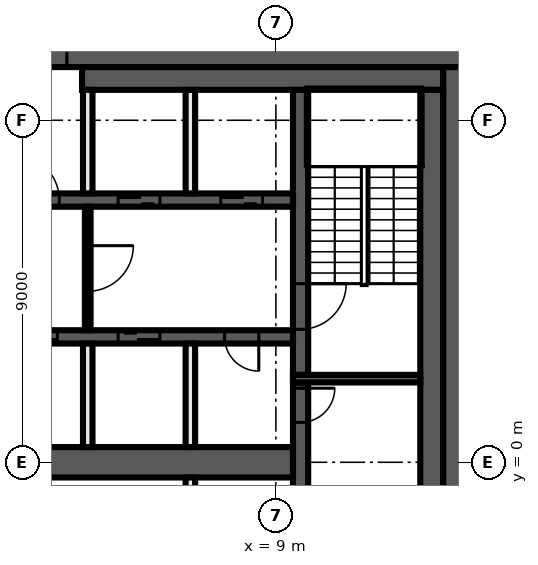
"""IFC4 building model, lengths in metres.
Left out: names, types, materials, properties, quantities, classifications, styles, units other than length and angle.
Written with IfcOpenShell. Run it as: python <this file> out.ifc"""

import sys

from ifc_helpers import new_model, si_unit, direction, frame, frame_2d, origin, place, context, subcontext, project, spatial, rectangle, extrude, element, fill, save


model = new_model("IFC4")
c1 = context("Model", 3, precision=1e-05, world=origin(), true_north=direction((0.0, 1.0)))
c2 = subcontext(c1, "Body", "Model", "MODEL_VIEW")
j1 = project(units=[si_unit("LENGTHUNIT", "METRE"), si_unit("PLANEANGLEUNIT", "RADIAN")], contexts=[c1])
p1 = place(None, origin())
s1 = spatial("IfcSite", under=j1, at=p1, CompositionType="ELEMENT")
p2 = place(p1, origin())
s2 = spatial("IfcBuilding", under=s1, at=p2, CompositionType="ELEMENT")
p3 = place(p2, frame((0.0, 0.0, 336.2)))
s3 = spatial("IfcBuildingStorey", under=s2, at=p3, CompositionType="ELEMENT", Elevation=336.2)
p4 = place(p3, frame((-14.0, 10.7, 0.0), z_axis=(0.0, 0.0, 1.0), x_axis=(1.0, 0.0, 0.0)))
e1 = element("IfcWall", 1, at=p4, inside=s3, PredefinedType="SHEAR", context=c2, shape_type="SweptSolid", body=[
    extrude(rectangle(XDim=28.0, YDim=0.6, at=frame_2d((14.0, 0.0))), origin(), (0.0, 0.0, 1.0), 3.82),
])
p5 = place(p4, frame((15.9, 0.0, 0.0)))
e2 = element("IfcOpeningElement", 2, at=p5, cuts=e1, PredefinedType="OPENING", context=c2, shape_type="SweptSolid", body=[
    extrude(rectangle(XDim=1.6, YDim=2.1, at=frame_2d((0.8, 1.05))), frame((0.0, 0.31, 0.0), z_axis=(0.0, -1.0, 0.0), x_axis=(1.0, 0.0, 0.0)), (0.0, 0.0, 1.0), 0.62),
])
p6 = place(p3, frame((13.7, 10.4, 0.0), z_axis=(0.0, 0.0, 1.0), x_axis=(0.0, -1.0, 0.0)))
e3 = element("IfcWall", 3, at=p6, inside=s3, PredefinedType="SHEAR", context=c2, shape_type="SweptSolid", body=[
    extrude(rectangle(XDim=20.8, YDim=0.6, at=frame_2d((10.4, 0.0))), origin(), (0.0, 0.0, 1.0), 3.82),
])
p7 = place(p3, frame((3.9, 10.1, 0.0), z_axis=(0.0, 0.0, 1.0), x_axis=(1.0, 0.0, 0.0)))
e4 = element("IfcWall", 4, at=p7, inside=s3, PredefinedType="SHEAR", context=c2, shape_type="SweptSolid", body=[
    extrude(rectangle(XDim=9.5, YDim=0.6, at=frame_2d((4.75, 0.0))), origin(), (0.0, 0.0, 1.0), 3.82),
])
p8 = place(p3, frame((13.1, 9.8, 0.0), z_axis=(0.0, 0.0, 1.0), x_axis=(0.0, -1.0, 0.0)))
e5 = element("IfcWall", 5, at=p8, inside=s3, PredefinedType="SHEAR", context=c2, shape_type="SweptSolid", body=[
    extrude(rectangle(XDim=19.6, YDim=0.6, at=frame_2d((9.8, 0.0))), origin(), (0.0, 0.0, 1.0), 3.82),
])
p9 = place(p3, frame((9.65, 2.1, 0.0), z_axis=(0.0, 0.0, 1.0), x_axis=(0.0, -1.0, 0.0)))
e6 = element("IfcWall", 6, at=p9, inside=s3, PredefinedType="SHEAR", context=c2, shape_type="SweptSolid", body=[
    extrude(rectangle(XDim=4.2, YDim=0.4, at=frame_2d((2.1, 0.0))), origin(), (0.0, 0.0, 1.0), 3.82),
])
p10 = place(p9, frame((0.15, 0.0, 0.0)))
e7 = element("IfcOpeningElement", 7, at=p10, cuts=e6, PredefinedType="OPENING", context=c2, shape_type="SweptSolid", body=[
    extrude(rectangle(XDim=0.9, YDim=2.1, at=frame_2d((0.45, 1.05))), frame((0.0, 0.21, 0.0), z_axis=(0.0, -1.0, 0.0), x_axis=(1.0, 0.0, 0.0)), (0.0, 0.0, 1.0), 0.42),
])
p11 = place(p3, frame((9.65, 9.8, 0.0), z_axis=(0.0, 0.0, 1.0), x_axis=(0.0, -1.0, 0.0)))
e8 = element("IfcWall", 8, at=p11, inside=s3, PredefinedType="SHEAR", context=c2, shape_type="SweptSolid", body=[
    extrude(rectangle(XDim=7.5, YDim=0.4, at=frame_2d((3.75, 0.0))), origin(), (0.0, 0.0, 1.0), 3.82),
])
p12 = place(p11, frame((5.1, 0.0, 0.0)))
e9 = element("IfcOpeningElement", 9, at=p12, cuts=e8, PredefinedType="OPENING", context=c2, shape_type="SweptSolid", body=[
    extrude(rectangle(XDim=1.2, YDim=2.1, at=frame_2d((0.6, 1.05))), frame((0.0, 0.21, 0.0), z_axis=(0.0, -1.0, 0.0), x_axis=(1.0, 0.0, 0.0)), (0.0, 0.0, 1.0), 0.42),
])
p13 = place(p3, frame((9.45, 2.2, 0.0), z_axis=(0.0, 0.0, 1.0), x_axis=(1.0, 0.0, 0.0)))
e10 = element("IfcWall", 10, at=p13, inside=s3, PredefinedType="SHEAR", context=c2, shape_type="SweptSolid", body=[
    extrude(rectangle(XDim=3.35, YDim=0.2, at=frame_2d((1.675, 0.0))), origin(), (0.0, 0.0, 1.0), 3.82),
])
p14 = place(p3, frame((-9.45, 6.9, 0.0), z_axis=(0.0, 0.0, 1.0), x_axis=(1.0, 0.0, 0.0)))
e11 = element("IfcWall", 11, at=p14, inside=s3, PredefinedType="SHEAR", context=c2, shape_type="SweptSolid", body=[
    extrude(rectangle(XDim=18.9, YDim=0.35, at=frame_2d((9.45, 0.0))), origin(), (0.0, 0.0, 1.0), 3.82),
])
p15 = place(p14, frame((11.55, 0.0, 0.0)))
e12 = element("IfcOpeningElement", 12, at=p15, cuts=e11, PredefinedType="OPENING", context=c2, shape_type="SweptSolid", body=[
    extrude(rectangle(XDim=1.2, YDim=2.1, at=frame_2d((0.6, 1.05))), frame((0.0, 0.185, 0.0), z_axis=(0.0, -1.0, 0.0), x_axis=(1.0, 0.0, 0.0)), (0.0, 0.0, 1.0), 0.37),
])
p16 = place(p14, frame((14.3, 0.0, 0.0)))
e13 = element("IfcOpeningElement", 13, at=p16, cuts=e11, PredefinedType="OPENING", context=c2, shape_type="SweptSolid", body=[
    extrude(rectangle(XDim=1.1, YDim=2.1, at=frame_2d((0.55, 1.05))), frame((0.0, 0.185, 0.0), z_axis=(0.0, -1.0, 0.0), x_axis=(1.0, 0.0, 0.0)), (0.0, 0.0, 1.0), 0.37),
])
p17 = place(p14, frame((17.0, 0.0, 0.0)))
e14 = element("IfcOpeningElement", 14, at=p17, cuts=e11, PredefinedType="OPENING", context=c2, shape_type="SweptSolid", body=[
    extrude(rectangle(XDim=1.1, YDim=2.1, at=frame_2d((0.55, 1.05))), frame((0.0, 0.185, 0.0), z_axis=(0.0, -1.0, 0.0), x_axis=(1.0, 0.0, 0.0)), (0.0, 0.0, 1.0), 0.37),
])
p18 = place(p14, frame((3.6, 0.0, 0.0)))
e15 = element("IfcOpeningElement", 15, at=p18, cuts=e11, PredefinedType="OPENING", context=c2, shape_type="SweptSolid", body=[
    extrude(rectangle(XDim=0.9, YDim=2.1, at=frame_2d((0.45, 1.05))), frame((0.0, 0.185, 0.0), z_axis=(0.0, -1.0, 0.0), x_axis=(1.0, 0.0, 0.0)), (0.0, 0.0, 1.0), 0.37),
])
p19 = place(p14, frame((9.0, 0.0, 0.0)))
e16 = element("IfcOpeningElement", 16, at=p19, cuts=e11, PredefinedType="OPENING", context=c2, shape_type="SweptSolid", body=[
    extrude(rectangle(XDim=0.9, YDim=2.1, at=frame_2d((0.45, 1.05))), frame((0.0, 0.185, 0.0), z_axis=(0.0, -1.0, 0.0), x_axis=(1.0, 0.0, 0.0)), (0.0, 0.0, 1.0), 0.37),
])
p20 = place(p3, frame((9.45, 3.3, 0.0), z_axis=(0.0, 0.0, 1.0), x_axis=(-1.0, 0.0, 0.0)))
e17 = element("IfcWall", 17, at=p20, inside=s3, PredefinedType="SHEAR", context=c2, shape_type="SweptSolid", body=[
    extrude(rectangle(XDim=18.9, YDim=0.35, at=frame_2d((9.45, 0.0))), origin(), (0.0, 0.0, 1.0), 3.82),
])
p21 = place(p20, frame((6.2, 0.0, 0.0)))
e18 = element("IfcOpeningElement", 18, at=p21, cuts=e17, PredefinedType="OPENING", context=c2, shape_type="SweptSolid", body=[
    extrude(rectangle(XDim=1.1, YDim=2.1, at=frame_2d((0.55, 1.05))), frame((0.0, 0.185, 0.0), z_axis=(0.0, -1.0, 0.0), x_axis=(1.0, 0.0, 0.0)), (0.0, 0.0, 1.0), 0.37),
])
p22 = place(p20, frame((3.5, 0.0, 0.0)))
e19 = element("IfcOpeningElement", 19, at=p22, cuts=e17, PredefinedType="OPENING", context=c2, shape_type="SweptSolid", body=[
    extrude(rectangle(XDim=1.1, YDim=2.1, at=frame_2d((0.55, 1.05))), frame((0.0, 0.185, 0.0), z_axis=(0.0, -1.0, 0.0), x_axis=(1.0, 0.0, 0.0)), (0.0, 0.0, 1.0), 0.37),
])
p23 = place(p20, frame((0.9, 0.0, 0.0)))
e20 = element("IfcOpeningElement", 20, at=p23, cuts=e17, PredefinedType="OPENING", context=c2, shape_type="SweptSolid", body=[
    extrude(rectangle(XDim=0.9, YDim=2.1, at=frame_2d((0.45, 1.05))), frame((0.0, 0.185, 0.0), z_axis=(0.0, -1.0, 0.0), x_axis=(1.0, 0.0, 0.0)), (0.0, 0.0, 1.0), 0.37),
])
p24 = place(p20, frame((17.1, 0.0, 0.0)))
e21 = element("IfcOpeningElement", 21, at=p24, cuts=e17, PredefinedType="OPENING", context=c2, shape_type="SweptSolid", body=[
    extrude(rectangle(XDim=0.9, YDim=2.1, at=frame_2d((0.45, 1.05))), frame((0.0, 0.185, 0.0), z_axis=(0.0, -1.0, 0.0), x_axis=(1.0, 0.0, 0.0)), (0.0, 0.0, 1.0), 0.37),
])
p25 = place(p20, frame((14.4, 0.0, 0.0)))
e22 = element("IfcOpeningElement", 22, at=p25, cuts=e17, PredefinedType="OPENING", context=c2, shape_type="SweptSolid", body=[
    extrude(rectangle(XDim=0.9, YDim=2.1, at=frame_2d((0.45, 1.05))), frame((0.0, 0.185, 0.0), z_axis=(0.0, -1.0, 0.0), x_axis=(1.0, 0.0, 0.0)), (0.0, 0.0, 1.0), 0.37),
])
p26 = place(p20, frame((11.7, 0.0, 0.0)))
e23 = element("IfcOpeningElement", 23, at=p26, cuts=e17, PredefinedType="OPENING", context=c2, shape_type="SweptSolid", body=[
    extrude(rectangle(XDim=0.9, YDim=2.1, at=frame_2d((0.45, 1.05))), frame((0.0, 0.185, 0.0), z_axis=(0.0, -1.0, 0.0), x_axis=(1.0, 0.0, 0.0)), (0.0, 0.0, 1.0), 0.37),
])
p27 = place(p20, frame((9.0, 0.0, 0.0)))
e24 = element("IfcOpeningElement", 24, at=p27, cuts=e17, PredefinedType="OPENING", context=c2, shape_type="SweptSolid", body=[
    extrude(rectangle(XDim=0.9, YDim=2.1, at=frame_2d((0.45, 1.05))), frame((0.0, 0.185, 0.0), z_axis=(0.0, -1.0, 0.0), x_axis=(1.0, 0.0, 0.0)), (0.0, 0.0, 1.0), 0.37),
])
p28 = place(p3, frame((-9.45, 0.0, 0.0), z_axis=(0.0, 0.0, 1.0), x_axis=(1.0, 0.0, 0.0)))
e25 = element("IfcWall", 25, at=p28, inside=s3, PredefinedType="SHEAR", context=c2, shape_type="SweptSolid", body=[
    extrude(rectangle(XDim=18.9, YDim=0.8, at=frame_2d((9.45, 0.0))), origin(), (0.0, 0.0, 1.0), 3.82),
])
for number, where, z_axis, x_axis in (
    (26, (6.75, -3.125, 0.0), (0.0, 0.0, 1.0), (0.0, 1.0, 0.0)),
    (27, (6.75, 0.4, 0.0), (0.0, 0.0, 1.0), (0.0, 1.0, 0.0)),
    (28, (6.75, 7.075, 0.0), (0.0, 0.0, 1.0), (0.0, 1.0, 0.0)),
):
    element("IfcWall", number, at=place(p3, frame(where, z_axis=z_axis, x_axis=x_axis)), inside=s3, PredefinedType="SOLIDWALL", context=c2, shape_type="SweptSolid", body=[
        extrude(rectangle(XDim=2.725, YDim=0.25, at=frame_2d((1.363, 0.0))), origin(), (0.0, 0.0, 1.0), 3.82),
    ])
p29 = place(p3, frame((4.05, 6.725, 0.0), z_axis=(0.0, 0.0, 1.0), x_axis=(0.0, -1.0, 0.0)))
e29 = element("IfcWall", 29, at=p29, inside=s3, PredefinedType="PARTITIONING", context=c2, shape_type="SweptSolid", body=[
    extrude(rectangle(XDim=3.25, YDim=0.15, at=frame_2d((1.625, 0.0))), origin(), (0.0, 0.0, 1.0), 3.82),
])
p30 = place(p29, frame((1.025, 0.0, 0.0)))
e30 = element("IfcOpeningElement", 30, at=p30, cuts=e29, PredefinedType="OPENING", context=c2, shape_type="SweptSolid", body=[
    extrude(rectangle(XDim=1.2, YDim=2.1, at=frame_2d((0.6, 1.05))), frame((0.0, 0.085, 0.0), z_axis=(0.0, -1.0, 0.0), x_axis=(1.0, 0.0, 0.0)), (0.0, 0.0, 1.0), 0.17),
])
for number, where, z_axis, x_axis in (
    (31, (4.05, 0.4, 0.0), (0.0, 0.0, 1.0), (0.0, 1.0, 0.0)),
    (32, (4.05, 7.075, 0.0), (0.0, 0.0, 1.0), (0.0, 1.0, 0.0)),
):
    element("IfcWall", number, at=place(p3, frame(where, z_axis=z_axis, x_axis=x_axis)), inside=s3, PredefinedType="SOLIDWALL", context=c2, shape_type="SweptSolid", body=[
        extrude(rectangle(XDim=2.725, YDim=0.25, at=frame_2d((1.363, 0.0))), origin(), (0.0, 0.0, 1.0), 3.82),
    ])
p31 = place(p10, origin())
e33 = element("IfcDoor", 33, at=p31, inside=s3, OperationType="SINGLE_SWING_RIGHT", PredefinedType="DOOR", context=c2, shape_type="SweptSolid", body=[
    extrude(rectangle(XDim=0.9, YDim=2.1, at=frame_2d((0.45, 1.05))), frame((0.0, 0.025, 0.0), z_axis=(0.0, -1.0, 0.0), x_axis=(1.0, 0.0, 0.0)), (0.0, 0.0, 1.0), 0.05),
])
fill(e7, e33)
p32 = place(p5, origin())
e34 = element("IfcDoor", 34, at=p32, inside=s3, OperationType="DOUBLE_DOOR_SINGLE_SWING", PredefinedType="DOOR", context=c2, shape_type="SweptSolid", body=[
    extrude(rectangle(XDim=1.6, YDim=2.1, at=frame_2d((0.8, 1.05))), frame((0.0, 0.025, 0.0), z_axis=(0.0, -1.0, 0.0), x_axis=(1.0, 0.0, 0.0)), (0.0, 0.0, 1.0), 0.05),
])
fill(e2, e34)
p33 = place(p15, origin())
e35 = element("IfcDoor", 35, at=p33, inside=s3, OperationType="SINGLE_SWING_LEFT", PredefinedType="DOOR", context=c2, shape_type="SweptSolid", body=[
    extrude(rectangle(XDim=1.2, YDim=2.1, at=frame_2d((0.6, 1.05))), frame((0.0, 0.025, 0.0), z_axis=(0.0, -1.0, 0.0), x_axis=(1.0, 0.0, 0.0)), (0.0, 0.0, 1.0), 0.05),
])
fill(e12, e35)
p34 = place(p16, origin())
e36 = element("IfcDoor", 36, at=p34, inside=s3, OperationType="DOUBLE_DOOR_SLIDING", PredefinedType="DOOR", context=c2, shape_type="SweptSolid", body=[
    extrude(rectangle(XDim=1.1, YDim=2.1, at=frame_2d((0.55, 1.05))), frame((0.0, 0.025, 0.0), z_axis=(0.0, -1.0, 0.0), x_axis=(1.0, 0.0, 0.0)), (0.0, 0.0, 1.0), 0.05),
])
fill(e13, e36)
p35 = place(p17, origin())
e37 = element("IfcDoor", 37, at=p35, inside=s3, OperationType="DOUBLE_DOOR_SLIDING", PredefinedType="DOOR", context=c2, shape_type="SweptSolid", body=[
    extrude(rectangle(XDim=1.1, YDim=2.1, at=frame_2d((0.55, 1.05))), frame((0.0, 0.025, 0.0), z_axis=(0.0, -1.0, 0.0), x_axis=(1.0, 0.0, 0.0)), (0.0, 0.0, 1.0), 0.05),
])
fill(e14, e37)
p36 = place(p21, origin())
e38 = element("IfcDoor", 38, at=p36, inside=s3, OperationType="DOUBLE_DOOR_SLIDING", PredefinedType="DOOR", context=c2, shape_type="SweptSolid", body=[
    extrude(rectangle(XDim=1.1, YDim=2.1, at=frame_2d((0.55, 1.05))), frame((0.0, 0.025, 0.0), z_axis=(0.0, -1.0, 0.0), x_axis=(1.0, 0.0, 0.0)), (0.0, 0.0, 1.0), 0.05),
])
fill(e18, e38)
p37 = place(p22, origin())
e39 = element("IfcDoor", 39, at=p37, inside=s3, OperationType="DOUBLE_DOOR_SLIDING", PredefinedType="DOOR", context=c2, shape_type="SweptSolid", body=[
    extrude(rectangle(XDim=1.1, YDim=2.1, at=frame_2d((0.55, 1.05))), frame((0.0, 0.025, 0.0), z_axis=(0.0, -1.0, 0.0), x_axis=(1.0, 0.0, 0.0)), (0.0, 0.0, 1.0), 0.05),
])
fill(e19, e39)
p38 = place(p23, origin())
e40 = element("IfcDoor", 40, at=p38, inside=s3, OperationType="SINGLE_SWING_LEFT", PredefinedType="DOOR", context=c2, shape_type="SweptSolid", body=[
    extrude(rectangle(XDim=0.9, YDim=2.1, at=frame_2d((0.45, 1.05))), frame((0.0, 0.025, 0.0), z_axis=(0.0, -1.0, 0.0), x_axis=(1.0, 0.0, 0.0)), (0.0, 0.0, 1.0), 0.05),
])
fill(e20, e40)
p39 = place(p12, origin())
e41 = element("IfcDoor", 41, at=p39, inside=s3, OperationType="SINGLE_SWING_LEFT", PredefinedType="DOOR", context=c2, shape_type="SweptSolid", body=[
    extrude(rectangle(XDim=1.2, YDim=2.1, at=frame_2d((0.6, 1.05))), frame((0.0, 0.025, 0.0), z_axis=(0.0, -1.0, 0.0), x_axis=(1.0, 0.0, 0.0)), (0.0, 0.0, 1.0), 0.05),
])
fill(e9, e41)
p40 = place(p30, origin())
e42 = element("IfcDoor", 42, at=p40, inside=s3, OperationType="SINGLE_SWING_RIGHT", PredefinedType="DOOR", context=c2, shape_type="SweptSolid", body=[
    extrude(rectangle(XDim=1.2, YDim=2.1, at=frame_2d((0.6, 1.05))), frame((0.0, 0.025, 0.0), z_axis=(0.0, -1.0, 0.0), x_axis=(1.0, 0.0, 0.0)), (0.0, 0.0, 1.0), 0.05),
])
fill(e30, e42)
save(model, sys.argv[1])
